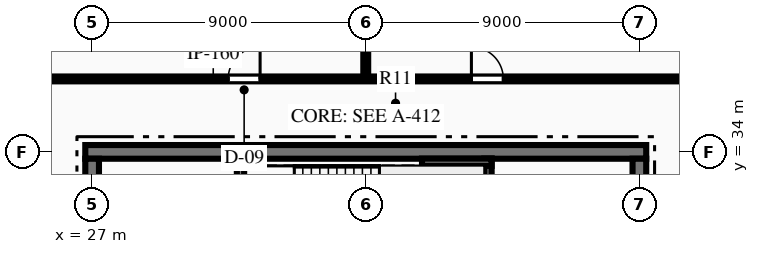
"""IFC4 building model, lengths in metres.
Left out: names, types, materials, properties, quantities, classifications, styles, units other than length and angle.
Written with IfcOpenShell. Run it as: python <this file> out.ifc"""

import sys

from ifc_helpers import new_model, si_unit, direction, frame, frame_2d, origin, place, context, subcontext, project, spatial, rectangle, extrude, element, fill, save


model = new_model("IFC4")
c1 = context("Model", 3, precision=1e-05, world=origin(), true_north=direction((0.0, 1.0)))
c2 = subcontext(c1, "Body", "Model", "MODEL_VIEW")
j1 = project(units=[si_unit("LENGTHUNIT", "METRE"), si_unit("PLANEANGLEUNIT", "RADIAN")], contexts=[c1])
p1 = place(None, origin())
s1 = spatial("IfcSite", under=j1, at=p1, CompositionType="ELEMENT")
p2 = place(p1, origin())
s2 = spatial("IfcBuilding", under=s1, at=p2, CompositionType="ELEMENT")
p3 = place(p2, frame((0.0, 0.0, 360.6)))
s3 = spatial("IfcBuildingStorey", under=s2, at=p3, CompositionType="ELEMENT", Elevation=360.6)
p4 = place(p3, frame((26.775, 34.0, 0.0), z_axis=(0.0, 0.0, 1.0), x_axis=(1.0, 0.0, 0.0)))
e1 = element("IfcWall", 1, at=p4, inside=s3, PredefinedType="SHEAR", context=c2, shape_type="SweptSolid", body=[
    extrude(rectangle(XDim=18.45, YDim=0.45, at=frame_2d((9.225, 0.0))), origin(), (0.0, 0.0, 1.0), 3.6),
])
p5 = place(p3, frame((27.0, 18.225, 0.0), z_axis=(0.0, 0.0, 1.0), x_axis=(0.0, 1.0, 0.0)))
e2 = element("IfcWall", 2, at=p5, inside=s3, PredefinedType="SHEAR", context=c2, shape_type="SweptSolid", body=[
    extrude(rectangle(XDim=15.55, YDim=0.45, at=frame_2d((7.775, 0.0))), origin(), (0.0, 0.0, 1.0), 3.6),
])
p6 = place(p5, frame((10.015, 0.0, 0.0)))
e3 = element("IfcOpeningElement", 3, at=p6, cuts=e2, PredefinedType="OPENING", context=c2, shape_type="SweptSolid", body=[
    extrude(rectangle(XDim=1.4, YDim=2.2, at=frame_2d((0.7, 1.1))), frame((0.0, 0.235, 0.0), z_axis=(0.0, -1.0, 0.0), x_axis=(1.0, 0.0, 0.0)), (0.0, 0.0, 1.0), 0.47),
])
p7 = place(p3, frame((45.0, 18.225, 0.0), z_axis=(0.0, 0.0, 1.0), x_axis=(0.0, 1.0, 0.0)))
e4 = element("IfcWall", 4, at=p7, inside=s3, PredefinedType="SHEAR", context=c2, shape_type="SweptSolid", body=[
    extrude(rectangle(XDim=15.55, YDim=0.45, at=frame_2d((7.775, 0.0))), origin(), (0.0, 0.0, 1.0), 3.6),
])
p8 = place(p7, frame((10.015, 0.0, 0.0)))
e5 = element("IfcOpeningElement", 5, at=p8, cuts=e4, PredefinedType="OPENING", context=c2, shape_type="SweptSolid", body=[
    extrude(rectangle(XDim=1.4, YDim=2.2, at=frame_2d((0.7, 1.1))), frame((0.0, 0.235, 0.0), z_axis=(0.0, -1.0, 0.0), x_axis=(1.0, 0.0, 0.0)), (0.0, 0.0, 1.0), 0.47),
])
p9 = place(p3, frame((31.88, 29.93, 0.0), z_axis=(0.0, 0.0, 1.0), x_axis=(0.0, 1.0, 0.0)))
e6 = element("IfcWall", 6, at=p9, inside=s3, PredefinedType="SHEAR", context=c2, shape_type="SweptSolid", body=[
    extrude(rectangle(XDim=3.79, YDim=0.24, at=frame_2d((1.895, 0.0))), origin(), (0.0, 0.0, 1.0), 3.6),
])
p10 = place(p3, frame((40.02, 29.93, 0.0), z_axis=(0.0, 0.0, 1.0), x_axis=(0.0, 1.0, 0.0)))
e7 = element("IfcWall", 7, at=p10, inside=s3, PredefinedType="SHEAR", context=c2, shape_type="SweptSolid", body=[
    extrude(rectangle(XDim=3.85, YDim=0.24, at=frame_2d((1.925, 0.0))), origin(), (0.0, 0.0, 1.0), 3.6),
])
p11 = place(p3, frame((37.85, 33.66, 0.0), z_axis=(0.0, 0.0, 1.0), x_axis=(1.0, 0.0, 0.0)))
e8 = element("IfcWall", 8, at=p11, inside=s3, PredefinedType="SHEAR", context=c2, shape_type="SweptSolid", body=[
    extrude(rectangle(XDim=2.29, YDim=0.24, at=frame_2d((1.145, 0.0))), origin(), (0.0, 0.0, 1.0), 3.6),
])
p12 = place(p3, frame((24.6, 36.4, 0.0), z_axis=(0.0, 0.0, 1.0), x_axis=(1.0, 0.0, 0.0)))
e9 = element("IfcWall", 9, at=p12, inside=s3, PredefinedType="PARTITIONING", context=c2, shape_type="SweptSolid", body=[
    extrude(rectangle(XDim=22.8, YDim=0.16, at=frame_2d((11.4, 0.0))), origin(), (0.0, 0.0, 1.0), 3.33),
])
p13 = place(p12, frame((6.875, 0.0, 0.0)))
e10 = element("IfcOpeningElement", 10, at=p13, cuts=e9, PredefinedType="OPENING", context=c2, shape_type="SweptSolid", body=[
    extrude(rectangle(XDim=1.05, YDim=2.15, at=frame_2d((0.525, 1.075))), frame((0.0, 0.09, 0.0), z_axis=(0.0, -1.0, 0.0), x_axis=(1.0, 0.0, 0.0)), (0.0, 0.0, 1.0), 0.18),
])
p14 = place(p12, frame((14.875, 0.0, 0.0)))
e11 = element("IfcOpeningElement", 11, at=p14, cuts=e9, PredefinedType="OPENING", context=c2, shape_type="SweptSolid", body=[
    extrude(rectangle(XDim=1.05, YDim=2.15, at=frame_2d((0.525, 1.075))), frame((0.0, 0.09, 0.0), z_axis=(0.0, -1.0, 0.0), x_axis=(1.0, 0.0, 0.0)), (0.0, 0.0, 1.0), 0.18),
])
p15 = place(p3, frame((36.0, 36.4, 0.0), z_axis=(0.0, 0.0, 1.0), x_axis=(0.0, 1.0, 0.0)))
e12 = element("IfcWall", 12, at=p15, inside=s3, PredefinedType="PARTITIONING", context=c2, shape_type="SweptSolid", body=[
    extrude(rectangle(XDim=11.22, YDim=0.16, at=frame_2d((5.61, 0.0))), origin(), (0.0, 0.0, 1.0), 3.33),
])
p16 = place(p13, origin())
e13 = element("IfcDoor", 13, at=p16, inside=s3, OperationType="SINGLE_SWING_RIGHT", PredefinedType="DOOR", context=c2, shape_type="SweptSolid", body=[
    extrude(rectangle(XDim=1.05, YDim=2.15, at=frame_2d((0.525, 1.075))), frame((0.0, 0.025, 0.0), z_axis=(0.0, -1.0, 0.0), x_axis=(1.0, 0.0, 0.0)), (0.0, 0.0, 1.0), 0.05),
])
fill(e10, e13)
p17 = place(p14, origin())
e14 = element("IfcDoor", 14, at=p17, inside=s3, OperationType="SINGLE_SWING_LEFT", PredefinedType="DOOR", context=c2, shape_type="SweptSolid", body=[
    extrude(rectangle(XDim=1.05, YDim=2.15, at=frame_2d((0.525, 1.075))), frame((0.0, 0.025, 0.0), z_axis=(0.0, -1.0, 0.0), x_axis=(1.0, 0.0, 0.0)), (0.0, 0.0, 1.0), 0.05),
])
fill(e11, e14)
save(model, sys.argv[1])
